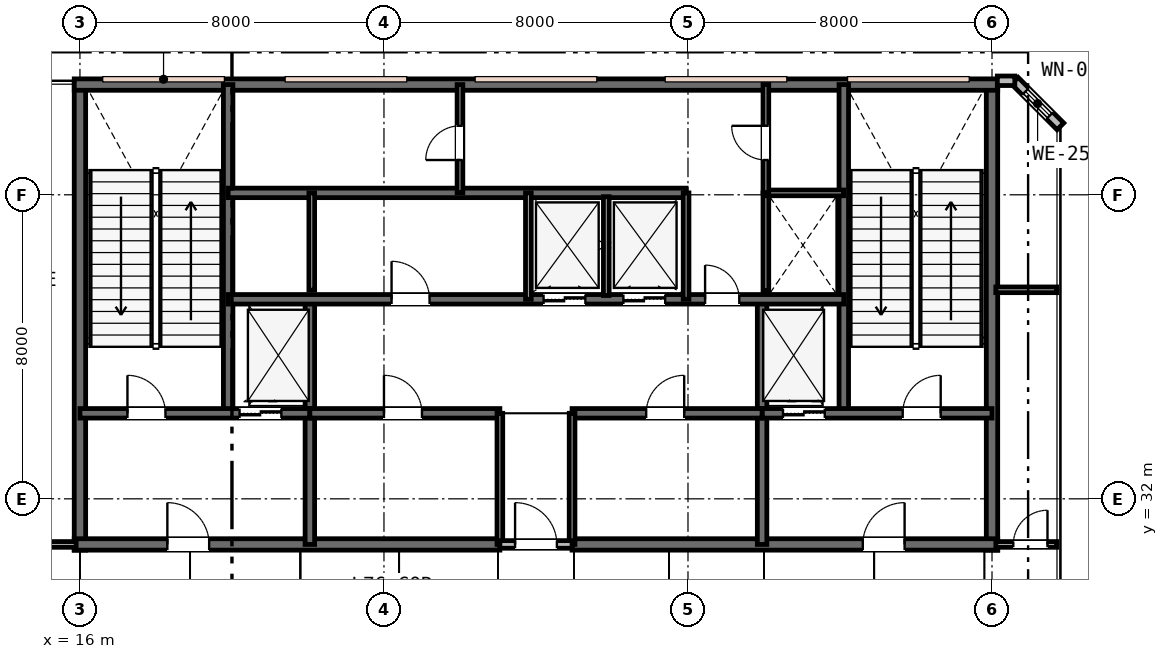
"""IFC4 building model, lengths in metres.
Left out: names, types, materials, properties, quantities, classifications, styles, units other than length and angle.
Written with IfcOpenShell. Run it as: python <this file> out.ifc"""

import sys

from ifc_helpers import new_model, si_unit, direction, frame, frame_2d, origin, place, context, subcontext, project, spatial, rectangle, extrude, element, fill, save


model = new_model("IFC4")
c1 = context("Model", 3, precision=1e-05, world=origin(), true_north=direction((0.0, 1.0)))
c2 = subcontext(c1, "Body", "Model", "MODEL_VIEW")
j1 = project(units=[si_unit("LENGTHUNIT", "METRE"), si_unit("PLANEANGLEUNIT", "RADIAN")], contexts=[c1])
p1 = place(None, origin())
s1 = spatial("IfcSite", under=j1, at=p1, CompositionType="ELEMENT")
p2 = place(p1, origin())
s2 = spatial("IfcBuilding", under=s1, at=p2, CompositionType="ELEMENT")
p3 = place(p2, frame((0.0, 0.0, 295.8)))
s3 = spatial("IfcBuildingStorey", under=s2, at=p3, CompositionType="ELEMENT", Elevation=295.8)
for number, where, z_axis, x_axis in (
    (1, (16.0, 30.65, 0.0), (0.0, 0.0, 1.0), (0.0, 1.0, 0.0)),
    (2, (40.0, 30.65, 0.0), (0.0, 0.0, 1.0), (0.0, 1.0, 0.0)),
):
    element("IfcWall", number, at=place(p3, frame(where, z_axis=z_axis, x_axis=x_axis)), inside=s3, PredefinedType="SHEAR", context=c2, shape_type="SweptSolid", body=[
        extrude(rectangle(XDim=12.3, YDim=0.3, at=frame_2d((6.15, 0.0))), origin(), (0.0, 0.0, 1.0), 5.2),
    ])
p4 = place(p3, frame((15.85, 42.9, 0.0), z_axis=(0.0, 0.0, 1.0), x_axis=(1.0, 0.0, 0.0)))
e3 = element("IfcWall", 3, at=p4, inside=s3, PredefinedType="SHEAR", context=c2, shape_type="SweptSolid", body=[
    extrude(rectangle(XDim=24.3, YDim=0.3, at=frame_2d((12.15, 0.0))), origin(), (0.0, 0.0, 1.0), 5.2),
])
p5 = place(p3, frame((15.85, 30.8, 0.0), z_axis=(0.0, 0.0, 1.0), x_axis=(1.0, 0.0, 0.0)))
e4 = element("IfcWall", 4, at=p5, inside=s3, PredefinedType="SHEAR", context=c2, shape_type="SweptSolid", body=[
    extrude(rectangle(XDim=11.2, YDim=0.3, at=frame_2d((5.6, 0.0))), origin(), (0.0, 0.0, 1.0), 5.2),
])
p6 = place(p5, frame((2.45, 0.0, 0.0)))
e5 = element("IfcOpeningElement", 5, at=p6, cuts=e4, PredefinedType="OPENING", context=c2, shape_type="SweptSolid", body=[
    extrude(rectangle(XDim=1.1, YDim=2.15, at=frame_2d((0.55, 1.075))), frame((0.0, 0.16, 0.0), z_axis=(0.0, -1.0, 0.0), x_axis=(1.0, 0.0, 0.0)), (0.0, 0.0, 1.0), 0.32),
])
p7 = place(p3, frame((28.95, 30.8, 0.0), z_axis=(0.0, 0.0, 1.0), x_axis=(1.0, 0.0, 0.0)))
e6 = element("IfcWall", 6, at=p7, inside=s3, PredefinedType="SHEAR", context=c2, shape_type="SweptSolid", body=[
    extrude(rectangle(XDim=11.2, YDim=0.3, at=frame_2d((5.6, 0.0))), origin(), (0.0, 0.0, 1.0), 5.2),
])
p8 = place(p7, frame((7.65, 0.0, 0.0)))
e7 = element("IfcOpeningElement", 7, at=p8, cuts=e6, PredefinedType="OPENING", context=c2, shape_type="SweptSolid", body=[
    extrude(rectangle(XDim=1.1, YDim=2.15, at=frame_2d((0.55, 1.075))), frame((0.0, 0.16, 0.0), z_axis=(0.0, -1.0, 0.0), x_axis=(1.0, 0.0, 0.0)), (0.0, 0.0, 1.0), 0.32),
])
for number, where, z_axis, x_axis in (
    (8, (19.9, 34.25, 0.0), (0.0, 0.0, 1.0), (0.0, 1.0, 0.0)),
    (9, (36.1, 34.25, 0.0), (0.0, 0.0, 1.0), (0.0, 1.0, 0.0)),
):
    element("IfcWall", number, at=place(p3, frame(where, z_axis=z_axis, x_axis=x_axis)), inside=s3, PredefinedType="SHEAR", context=c2, shape_type="SweptSolid", body=[
        extrude(rectangle(XDim=8.65, YDim=0.25, at=frame_2d((4.325, 0.0))), origin(), (0.0, 0.0, 1.0), 5.2),
    ])
for number, where, z_axis, x_axis in (
    (10, (22.05, 30.8, 0.0), (0.0, 0.0, 1.0), (0.0, 1.0, 0.0)),
    (11, (33.95, 30.8, 0.0), (0.0, 0.0, 1.0), (0.0, 1.0, 0.0)),
):
    element("IfcWall", number, at=place(p3, frame(where, z_axis=z_axis, x_axis=x_axis)), inside=s3, PredefinedType="SHEAR", context=c2, shape_type="SweptSolid", body=[
        extrude(rectangle(XDim=6.45, YDim=0.25, at=frame_2d((3.225, 0.0))), origin(), (0.0, 0.0, 1.0), 5.2),
    ])
p9 = place(p3, frame((16.0, 34.25, 0.0), z_axis=(0.0, 0.0, 1.0), x_axis=(1.0, 0.0, 0.0)))
e12 = element("IfcWall", 12, at=p9, inside=s3, PredefinedType="SHEAR", context=c2, shape_type="SweptSolid", body=[
    extrude(rectangle(XDim=6.05, YDim=0.25, at=frame_2d((3.025, 0.0))), origin(), (0.0, 0.0, 1.0), 5.2),
])
p10 = place(p9, frame((1.25, 0.0, 0.0)))
e13 = element("IfcOpeningElement", 13, at=p10, cuts=e12, PredefinedType="OPENING", context=c2, shape_type="SweptSolid", body=[
    extrude(rectangle(XDim=1.0, YDim=2.15, at=frame_2d((0.5, 1.075))), frame((0.0, 0.135, 0.0), z_axis=(0.0, -1.0, 0.0), x_axis=(1.0, 0.0, 0.0)), (0.0, 0.0, 1.0), 0.27),
])
p11 = place(p9, frame((4.2, 0.0, 0.0)))
e14 = element("IfcOpeningElement", 14, at=p11, cuts=e12, PredefinedType="OPENING", context=c2, shape_type="SweptSolid", body=[
    extrude(rectangle(XDim=1.1, YDim=2.15, at=frame_2d((0.55, 1.075))), frame((0.0, 0.135, 0.0), z_axis=(0.0, -1.0, 0.0), x_axis=(1.0, 0.0, 0.0)), (0.0, 0.0, 1.0), 0.27),
])
p12 = place(p3, frame((33.95, 34.25, 0.0), z_axis=(0.0, 0.0, 1.0), x_axis=(1.0, 0.0, 0.0)))
e15 = element("IfcWall", 15, at=p12, inside=s3, PredefinedType="SHEAR", context=c2, shape_type="SweptSolid", body=[
    extrude(rectangle(XDim=6.05, YDim=0.25, at=frame_2d((3.025, 0.0))), origin(), (0.0, 0.0, 1.0), 5.2),
])
p13 = place(p12, frame((3.7, 0.0, 0.0)))
e16 = element("IfcOpeningElement", 16, at=p13, cuts=e15, PredefinedType="OPENING", context=c2, shape_type="SweptSolid", body=[
    extrude(rectangle(XDim=1.0, YDim=2.15, at=frame_2d((0.5, 1.075))), frame((0.0, 0.135, 0.0), z_axis=(0.0, -1.0, 0.0), x_axis=(1.0, 0.0, 0.0)), (0.0, 0.0, 1.0), 0.27),
])
p14 = place(p12, frame((0.55, 0.0, 0.0)))
e17 = element("IfcOpeningElement", 17, at=p14, cuts=e15, PredefinedType="OPENING", context=c2, shape_type="SweptSolid", body=[
    extrude(rectangle(XDim=1.1, YDim=2.15, at=frame_2d((0.55, 1.075))), frame((0.0, 0.135, 0.0), z_axis=(0.0, -1.0, 0.0), x_axis=(1.0, 0.0, 0.0)), (0.0, 0.0, 1.0), 0.27),
])
p15 = place(p3, frame((22.05, 34.25, 0.0), z_axis=(0.0, 0.0, 1.0), x_axis=(1.0, 0.0, 0.0)))
e18 = element("IfcWall", 18, at=p15, inside=s3, PredefinedType="SHEAR", context=c2, shape_type="SweptSolid", body=[
    extrude(rectangle(XDim=5.0, YDim=0.25, at=frame_2d((2.5, 0.0))), origin(), (0.0, 0.0, 1.0), 5.2),
])
p16 = place(p15, frame((1.95, 0.0, 0.0)))
e19 = element("IfcOpeningElement", 19, at=p16, cuts=e18, PredefinedType="OPENING", context=c2, shape_type="SweptSolid", body=[
    extrude(rectangle(XDim=1.0, YDim=2.15, at=frame_2d((0.5, 1.075))), frame((0.0, 0.135, 0.0), z_axis=(0.0, -1.0, 0.0), x_axis=(1.0, 0.0, 0.0)), (0.0, 0.0, 1.0), 0.27),
])
p17 = place(p3, frame((28.95, 34.25, 0.0), z_axis=(0.0, 0.0, 1.0), x_axis=(1.0, 0.0, 0.0)))
e20 = element("IfcWall", 20, at=p17, inside=s3, PredefinedType="SHEAR", context=c2, shape_type="SweptSolid", body=[
    extrude(rectangle(XDim=5.0, YDim=0.25, at=frame_2d((2.5, 0.0))), origin(), (0.0, 0.0, 1.0), 5.2),
])
p18 = place(p17, frame((1.95, 0.0, 0.0)))
e21 = element("IfcOpeningElement", 21, at=p18, cuts=e20, PredefinedType="OPENING", context=c2, shape_type="SweptSolid", body=[
    extrude(rectangle(XDim=1.0, YDim=2.15, at=frame_2d((0.5, 1.075))), frame((0.0, 0.135, 0.0), z_axis=(0.0, -1.0, 0.0), x_axis=(1.0, 0.0, 0.0)), (0.0, 0.0, 1.0), 0.27),
])
p19 = place(p3, frame((19.9, 37.25, 0.0), z_axis=(0.0, 0.0, 1.0), x_axis=(1.0, 0.0, 0.0)))
e22 = element("IfcWall", 22, at=p19, inside=s3, PredefinedType="SHEAR", context=c2, shape_type="SweptSolid", body=[
    extrude(rectangle(XDim=16.2, YDim=0.25, at=frame_2d((8.1, 0.0))), origin(), (0.0, 0.0, 1.0), 5.2),
])
p20 = place(p19, frame((4.3, 0.0, 0.0)))
e23 = element("IfcOpeningElement", 23, at=p20, cuts=e22, PredefinedType="OPENING", context=c2, shape_type="SweptSolid", body=[
    extrude(rectangle(XDim=1.0, YDim=2.15, at=frame_2d((0.5, 1.075))), frame((0.0, 0.135, 0.0), z_axis=(0.0, -1.0, 0.0), x_axis=(1.0, 0.0, 0.0)), (0.0, 0.0, 1.0), 0.27),
])
p21 = place(p19, frame((12.55, 0.0, 0.0)))
e24 = element("IfcOpeningElement", 24, at=p21, cuts=e22, PredefinedType="OPENING", context=c2, shape_type="SweptSolid", body=[
    extrude(rectangle(XDim=0.9, YDim=2.15, at=frame_2d((0.45, 1.075))), frame((0.0, 0.135, 0.0), z_axis=(0.0, -1.0, 0.0), x_axis=(1.0, 0.0, 0.0)), (0.0, 0.0, 1.0), 0.27),
])
p22 = place(p19, frame((8.3, 0.0, 0.0)))
e25 = element("IfcOpeningElement", 25, at=p22, cuts=e22, PredefinedType="OPENING", context=c2, shape_type="SweptSolid", body=[
    extrude(rectangle(XDim=1.1, YDim=2.15, at=frame_2d((0.55, 1.075))), frame((0.0, 0.135, 0.0), z_axis=(0.0, -1.0, 0.0), x_axis=(1.0, 0.0, 0.0)), (0.0, 0.0, 1.0), 0.27),
])
p23 = place(p19, frame((10.4, 0.0, 0.0)))
e26 = element("IfcOpeningElement", 26, at=p23, cuts=e22, PredefinedType="OPENING", context=c2, shape_type="SweptSolid", body=[
    extrude(rectangle(XDim=1.1, YDim=2.15, at=frame_2d((0.55, 1.075))), frame((0.0, 0.135, 0.0), z_axis=(0.0, -1.0, 0.0), x_axis=(1.0, 0.0, 0.0)), (0.0, 0.0, 1.0), 0.27),
])
p24 = place(p3, frame((19.9, 40.05, 0.0), z_axis=(0.0, 0.0, 1.0), x_axis=(1.0, 0.0, 0.0)))
e27 = element("IfcWall", 27, at=p24, inside=s3, PredefinedType="SHEAR", context=c2, shape_type="SweptSolid", body=[
    extrude(rectangle(XDim=12.05, YDim=0.25, at=frame_2d((6.025, 0.0))), origin(), (0.0, 0.0, 1.0), 5.2),
])
p25 = place(p3, frame((41.8, 41.8, 0.0), z_axis=(0.0, 0.0, 1.0), x_axis=(-0.707106781187, 0.707106781187, 0.0)))
e28 = element("IfcWall", 28, at=p25, inside=s3, PredefinedType="STANDARD", context=c2, shape_type="SweptSolid", body=[
    extrude(rectangle(XDim=1.697, YDim=0.25, at=frame_2d((0.849, 0.0))), origin(), (0.0, 0.0, 1.0), 4.91),
])
p26 = place(p25, frame((0.399, 0.0, 0.9)))
e29 = element("IfcOpeningElement", 29, at=p26, cuts=e28, PredefinedType="OPENING", context=c2, shape_type="SweptSolid", body=[
    extrude(rectangle(XDim=0.9, YDim=1.55, at=frame_2d((0.45, 0.775))), frame((0.0, 0.135, 0.0), z_axis=(0.0, -1.0, 0.0), x_axis=(1.0, 0.0, 0.0)), (0.0, 0.0, 1.0), 0.27),
])
p27 = place(p3, frame((40.6, 43.0, 0.0), z_axis=(0.0, 0.0, 1.0), x_axis=(-1.0, 0.0, 0.0)))
e30 = element("IfcWall", 30, at=p27, inside=s3, PredefinedType="STANDARD", context=c2, shape_type="SweptSolid", body=[
    extrude(rectangle(XDim=0.46, YDim=0.25, at=frame_2d((0.23, 0.0))), origin(), (0.0, 0.0, 1.0), 4.91),
])
for number, where, z_axis, x_axis in (
    (31, (27.05, 30.8, 0.0), (0.0, 0.0, 1.0), (0.0, 1.0, 0.0)),
    (32, (28.95, 30.8, 0.0), (0.0, 0.0, 1.0), (0.0, 1.0, 0.0)),
):
    element("IfcWall", number, at=place(p3, frame(where, z_axis=z_axis, x_axis=x_axis)), inside=s3, PredefinedType="PLUMBINGWALL", context=c2, shape_type="SweptSolid", body=[
        extrude(rectangle(XDim=3.45, YDim=0.15, at=frame_2d((1.725, 0.0))), origin(), (0.0, 0.0, 1.0), 4.91),
    ])
p28 = place(p3, frame((27.05, 30.8, 0.0), z_axis=(0.0, 0.0, 1.0), x_axis=(1.0, 0.0, 0.0)))
e33 = element("IfcWall", 33, at=p28, inside=s3, PredefinedType="PARTITIONING", context=c2, shape_type="SweptSolid", body=[
    extrude(rectangle(XDim=1.9, YDim=0.2, at=frame_2d((0.95, 0.0))), origin(), (0.0, 0.0, 1.0), 4.91),
])
p29 = place(p28, frame((0.4, 0.0, 0.0)))
e34 = element("IfcOpeningElement", 34, at=p29, cuts=e33, PredefinedType="OPENING", context=c2, shape_type="SweptSolid", body=[
    extrude(rectangle(XDim=1.1, YDim=2.15, at=frame_2d((0.55, 1.075))), frame((0.0, 0.11, 0.0), z_axis=(0.0, -1.0, 0.0), x_axis=(1.0, 0.0, 0.0)), (0.0, 0.0, 1.0), 0.22),
])
p30 = place(p3, frame((22.1, 37.49, 0.0), z_axis=(0.0, 0.0, 1.0), x_axis=(0.0, 1.0, 0.0)))
e35 = element("IfcWall", 35, at=p30, inside=s3, PredefinedType="PLUMBINGWALL", context=c2, shape_type="SweptSolid", body=[
    extrude(rectangle(XDim=2.56, YDim=0.15, at=frame_2d((1.28, 0.0))), origin(), (0.0, 0.0, 1.0), 4.91),
])
for number, where, z_axis, x_axis in (
    (36, (27.8, 37.25, 0.0), (0.0, 0.0, 1.0), (0.0, 1.0, 0.0)),
    (37, (31.95, 37.25, 0.0), (0.0, 0.0, 1.0), (0.0, 1.0, 0.0)),
):
    element("IfcWall", number, at=place(p3, frame(where, z_axis=z_axis, x_axis=x_axis)), inside=s3, PredefinedType="PLUMBINGWALL", context=c2, shape_type="SweptSolid", body=[
        extrude(rectangle(XDim=2.8, YDim=0.15, at=frame_2d((1.4, 0.0))), origin(), (0.0, 0.0, 1.0), 4.91),
    ])
p31 = place(p3, frame((29.85, 37.35, 0.0), z_axis=(0.0, 0.0, 1.0), x_axis=(0.0, 1.0, 0.0)))
e38 = element("IfcWall", 38, at=p31, inside=s3, PredefinedType="PLUMBINGWALL", context=c2, shape_type="SweptSolid", body=[
    extrude(rectangle(XDim=2.6, YDim=0.15, at=frame_2d((1.3, 0.0))), origin(), (0.0, 0.0, 1.0), 4.91),
])
p32 = place(p3, frame((34.05, 37.473, 0.0), z_axis=(0.0, 0.0, 1.0), x_axis=(0.0, 1.0, 0.0)))
e39 = element("IfcWall", 39, at=p32, inside=s3, PredefinedType="PLUMBINGWALL", context=c2, shape_type="SweptSolid", body=[
    extrude(rectangle(XDim=2.577, YDim=0.15, at=frame_2d((1.288, 0.0))), origin(), (0.0, 0.0, 1.0), 4.91),
])
p33 = place(p3, frame((34.05, 40.05, 0.0), z_axis=(0.0, 0.0, 1.0), x_axis=(1.0, 0.0, 0.0)))
e40 = element("IfcWall", 40, at=p33, inside=s3, PredefinedType="PARTITIONING", context=c2, shape_type="SweptSolid", body=[
    extrude(rectangle(XDim=2.05, YDim=0.15, at=frame_2d((1.025, 0.0))), origin(), (0.0, 0.0, 1.0), 4.91),
])
p34 = place(p3, frame((34.05, 40.05, 0.0), z_axis=(0.0, 0.0, 1.0), x_axis=(0.0, 1.0, 0.0)))
e41 = element("IfcWall", 41, at=p34, inside=s3, PredefinedType="PARTITIONING", context=c2, shape_type="SweptSolid", body=[
    extrude(rectangle(XDim=2.85, YDim=0.15, at=frame_2d((1.425, 0.0))), origin(), (0.0, 0.0, 1.0), 4.91),
])
p35 = place(p34, frame((0.865, 0.0, 0.0)))
e42 = element("IfcOpeningElement", 42, at=p35, cuts=e41, PredefinedType="OPENING", context=c2, shape_type="SweptSolid", body=[
    extrude(rectangle(XDim=0.9, YDim=2.15, at=frame_2d((0.45, 1.075))), frame((0.0, 0.085, 0.0), z_axis=(0.0, -1.0, 0.0), x_axis=(1.0, 0.0, 0.0)), (0.0, 0.0, 1.0), 0.17),
])
p36 = place(p3, frame((26.0, 40.05, 0.0), z_axis=(0.0, 0.0, 1.0), x_axis=(0.0, 1.0, 0.0)))
e43 = element("IfcWall", 43, at=p36, inside=s3, PredefinedType="PARTITIONING", context=c2, shape_type="SweptSolid", body=[
    extrude(rectangle(XDim=2.85, YDim=0.15, at=frame_2d((1.425, 0.0))), origin(), (0.0, 0.0, 1.0), 4.91),
])
p37 = place(p36, frame((0.865, 0.0, 0.0)))
e44 = element("IfcOpeningElement", 44, at=p37, cuts=e43, PredefinedType="OPENING", context=c2, shape_type="SweptSolid", body=[
    extrude(rectangle(XDim=0.9, YDim=2.15, at=frame_2d((0.45, 1.075))), frame((0.0, 0.085, 0.0), z_axis=(0.0, -1.0, 0.0), x_axis=(1.0, 0.0, 0.0)), (0.0, 0.0, 1.0), 0.17),
])
p38 = place(p3, frame((40.1, 30.8, 0.0), z_axis=(0.0, 0.0, 1.0), x_axis=(1.0, 0.0, 0.0)))
e45 = element("IfcWall", 45, at=p38, inside=s3, PredefinedType="PARTITIONING", context=c2, shape_type="SweptSolid", body=[
    extrude(rectangle(XDim=1.6, YDim=0.15, at=frame_2d((0.8, 0.0))), origin(), (0.0, 0.0, 1.0), 4.91),
])
p39 = place(p38, frame((0.46, 0.0, 0.0)))
e46 = element("IfcOpeningElement", 46, at=p39, cuts=e45, PredefinedType="OPENING", context=c2, shape_type="SweptSolid", body=[
    extrude(rectangle(XDim=0.9, YDim=2.15, at=frame_2d((0.45, 1.075))), frame((0.0, 0.085, 0.0), z_axis=(0.0, -1.0, 0.0), x_axis=(1.0, 0.0, 0.0)), (0.0, 0.0, 1.0), 0.17),
])
p40 = place(p3, frame((40.1, 37.5, 0.0), z_axis=(0.0, 0.0, 1.0), x_axis=(1.0, 0.0, 0.0)))
e47 = element("IfcWall", 47, at=p40, inside=s3, PredefinedType="PARTITIONING", context=c2, shape_type="SweptSolid", body=[
    extrude(rectangle(XDim=1.6, YDim=0.15, at=frame_2d((0.8, 0.0))), origin(), (0.0, 0.0, 1.0), 4.91),
])
p41 = place(p3, frame((9.3, 30.8, 0.0), z_axis=(0.0, 0.0, 1.0), x_axis=(1.0, 0.0, 0.0)))
e48 = element("IfcWall", 48, at=p41, inside=s3, PredefinedType="PARTITIONING", context=c2, shape_type="SweptSolid", body=[
    extrude(rectangle(XDim=6.6, YDim=0.15, at=frame_2d((3.3, 0.0))), origin(), (0.0, 0.0, 1.0), 4.91),
])
p42 = place(p41, frame((2.875, 0.0, 0.0)))
e49 = element("IfcOpeningElement", 49, at=p42, cuts=e48, PredefinedType="OPENING", context=c2, shape_type="SweptSolid", body=[
    extrude(rectangle(XDim=0.95, YDim=2.15, at=frame_2d((0.475, 1.075))), frame((0.0, 0.085, 0.0), z_axis=(0.0, -1.0, 0.0), x_axis=(1.0, 0.0, 0.0)), (0.0, 0.0, 1.0), 0.17),
])
p43 = place(p26, origin())
e50 = element("IfcWindow", 50, at=p43, inside=s3, PartitioningType="SINGLE_PANEL", PredefinedType="WINDOW", context=c2, shape_type="SweptSolid", body=[
    extrude(rectangle(XDim=0.9, YDim=1.55, at=frame_2d((0.45, 0.775))), frame((0.0, 0.03, 0.0), z_axis=(0.0, -1.0, 0.0), x_axis=(1.0, 0.0, 0.0)), (0.0, 0.0, 1.0), 0.06),
])
fill(e29, e50)
p44 = place(p29, origin())
e51 = element("IfcDoor", 51, at=p44, inside=s3, OperationType="SINGLE_SWING_LEFT", PredefinedType="DOOR", context=c2, shape_type="SweptSolid", body=[
    extrude(rectangle(XDim=1.1, YDim=2.15, at=frame_2d((0.55, 1.075))), frame((0.0, 0.025, 0.0), z_axis=(0.0, -1.0, 0.0), x_axis=(1.0, 0.0, 0.0)), (0.0, 0.0, 1.0), 0.05),
])
fill(e34, e51)
p45 = place(p10, origin())
e52 = element("IfcDoor", 52, at=p45, inside=s3, OperationType="SINGLE_SWING_LEFT", PredefinedType="DOOR", context=c2, shape_type="SweptSolid", body=[
    extrude(rectangle(XDim=1.0, YDim=2.15, at=frame_2d((0.5, 1.075))), frame((0.0, 0.025, 0.0), z_axis=(0.0, -1.0, 0.0), x_axis=(1.0, 0.0, 0.0)), (0.0, 0.0, 1.0), 0.05),
])
fill(e13, e52)
p46 = place(p13, origin())
e53 = element("IfcDoor", 53, at=p46, inside=s3, OperationType="SINGLE_SWING_RIGHT", PredefinedType="DOOR", context=c2, shape_type="SweptSolid", body=[
    extrude(rectangle(XDim=1.0, YDim=2.15, at=frame_2d((0.5, 1.075))), frame((0.0, 0.025, 0.0), z_axis=(0.0, -1.0, 0.0), x_axis=(1.0, 0.0, 0.0)), (0.0, 0.0, 1.0), 0.05),
])
fill(e16, e53)
p47 = place(p6, origin())
e54 = element("IfcDoor", 54, at=p47, inside=s3, OperationType="SINGLE_SWING_LEFT", PredefinedType="DOOR", context=c2, shape_type="SweptSolid", body=[
    extrude(rectangle(XDim=1.1, YDim=2.15, at=frame_2d((0.55, 1.075))), frame((0.0, 0.025, 0.0), z_axis=(0.0, -1.0, 0.0), x_axis=(1.0, 0.0, 0.0)), (0.0, 0.0, 1.0), 0.05),
])
fill(e5, e54)
p48 = place(p8, origin())
e55 = element("IfcDoor", 55, at=p48, inside=s3, OperationType="SINGLE_SWING_RIGHT", PredefinedType="DOOR", context=c2, shape_type="SweptSolid", body=[
    extrude(rectangle(XDim=1.1, YDim=2.15, at=frame_2d((0.55, 1.075))), frame((0.0, 0.025, 0.0), z_axis=(0.0, -1.0, 0.0), x_axis=(1.0, 0.0, 0.0)), (0.0, 0.0, 1.0), 0.05),
])
fill(e7, e55)
p49 = place(p16, origin())
e56 = element("IfcDoor", 56, at=p49, inside=s3, OperationType="SINGLE_SWING_LEFT", PredefinedType="DOOR", context=c2, shape_type="SweptSolid", body=[
    extrude(rectangle(XDim=1.0, YDim=2.15, at=frame_2d((0.5, 1.075))), frame((0.0, 0.025, 0.0), z_axis=(0.0, -1.0, 0.0), x_axis=(1.0, 0.0, 0.0)), (0.0, 0.0, 1.0), 0.05),
])
fill(e19, e56)
p50 = place(p18, origin())
e57 = element("IfcDoor", 57, at=p50, inside=s3, OperationType="SINGLE_SWING_RIGHT", PredefinedType="DOOR", context=c2, shape_type="SweptSolid", body=[
    extrude(rectangle(XDim=1.0, YDim=2.15, at=frame_2d((0.5, 1.075))), frame((0.0, 0.025, 0.0), z_axis=(0.0, -1.0, 0.0), x_axis=(1.0, 0.0, 0.0)), (0.0, 0.0, 1.0), 0.05),
])
fill(e21, e57)
p51 = place(p20, origin())
e58 = element("IfcDoor", 58, at=p51, inside=s3, OperationType="SINGLE_SWING_LEFT", PredefinedType="DOOR", context=c2, shape_type="SweptSolid", body=[
    extrude(rectangle(XDim=1.0, YDim=2.15, at=frame_2d((0.5, 1.075))), frame((0.0, 0.025, 0.0), z_axis=(0.0, -1.0, 0.0), x_axis=(1.0, 0.0, 0.0)), (0.0, 0.0, 1.0), 0.05),
])
fill(e23, e58)
p52 = place(p21, origin())
e59 = element("IfcDoor", 59, at=p52, inside=s3, OperationType="SINGLE_SWING_LEFT", PredefinedType="DOOR", context=c2, shape_type="SweptSolid", body=[
    extrude(rectangle(XDim=0.9, YDim=2.15, at=frame_2d((0.45, 1.075))), frame((0.0, 0.025, 0.0), z_axis=(0.0, -1.0, 0.0), x_axis=(1.0, 0.0, 0.0)), (0.0, 0.0, 1.0), 0.05),
])
fill(e24, e59)
p53 = place(p35, origin())
e60 = element("IfcDoor", 60, at=p53, inside=s3, OperationType="SINGLE_SWING_RIGHT", PredefinedType="DOOR", context=c2, shape_type="SweptSolid", body=[
    extrude(rectangle(XDim=0.9, YDim=2.15, at=frame_2d((0.45, 1.075))), frame((0.0, 0.025, 0.0), z_axis=(0.0, -1.0, 0.0), x_axis=(1.0, 0.0, 0.0)), (0.0, 0.0, 1.0), 0.05),
])
fill(e42, e60)
p54 = place(p37, origin())
e61 = element("IfcDoor", 61, at=p54, inside=s3, OperationType="SINGLE_SWING_LEFT", PredefinedType="DOOR", context=c2, shape_type="SweptSolid", body=[
    extrude(rectangle(XDim=0.9, YDim=2.15, at=frame_2d((0.45, 1.075))), frame((0.0, 0.025, 0.0), z_axis=(0.0, -1.0, 0.0), x_axis=(1.0, 0.0, 0.0)), (0.0, 0.0, 1.0), 0.05),
])
fill(e44, e61)
p55 = place(p39, origin())
e62 = element("IfcDoor", 62, at=p55, inside=s3, OperationType="SINGLE_SWING_RIGHT", PredefinedType="DOOR", context=c2, shape_type="SweptSolid", body=[
    extrude(rectangle(XDim=0.9, YDim=2.15, at=frame_2d((0.45, 1.075))), frame((0.0, 0.025, 0.0), z_axis=(0.0, -1.0, 0.0), x_axis=(1.0, 0.0, 0.0)), (0.0, 0.0, 1.0), 0.05),
])
fill(e46, e62)
p56 = place(p11, origin())
e63 = element("IfcDoor", 63, at=p56, inside=s3, OperationType="DOUBLE_DOOR_SLIDING", PredefinedType="DOOR", context=c2, shape_type="SweptSolid", body=[
    extrude(rectangle(XDim=1.1, YDim=2.15, at=frame_2d((0.55, 1.075))), frame((0.0, 0.025, 0.0), z_axis=(0.0, -1.0, 0.0), x_axis=(1.0, 0.0, 0.0)), (0.0, 0.0, 1.0), 0.05),
])
fill(e14, e63)
p57 = place(p14, origin())
e64 = element("IfcDoor", 64, at=p57, inside=s3, OperationType="DOUBLE_DOOR_SLIDING", PredefinedType="DOOR", context=c2, shape_type="SweptSolid", body=[
    extrude(rectangle(XDim=1.1, YDim=2.15, at=frame_2d((0.55, 1.075))), frame((0.0, 0.025, 0.0), z_axis=(0.0, -1.0, 0.0), x_axis=(1.0, 0.0, 0.0)), (0.0, 0.0, 1.0), 0.05),
])
fill(e17, e64)
p58 = place(p22, origin())
e65 = element("IfcDoor", 65, at=p58, inside=s3, OperationType="DOUBLE_DOOR_SLIDING", PredefinedType="DOOR", context=c2, shape_type="SweptSolid", body=[
    extrude(rectangle(XDim=1.1, YDim=2.15, at=frame_2d((0.55, 1.075))), frame((0.0, 0.025, 0.0), z_axis=(0.0, -1.0, 0.0), x_axis=(1.0, 0.0, 0.0)), (0.0, 0.0, 1.0), 0.05),
])
fill(e25, e65)
p59 = place(p23, origin())
e66 = element("IfcDoor", 66, at=p59, inside=s3, OperationType="DOUBLE_DOOR_SLIDING", PredefinedType="DOOR", context=c2, shape_type="SweptSolid", body=[
    extrude(rectangle(XDim=1.1, YDim=2.15, at=frame_2d((0.55, 1.075))), frame((0.0, 0.025, 0.0), z_axis=(0.0, -1.0, 0.0), x_axis=(1.0, 0.0, 0.0)), (0.0, 0.0, 1.0), 0.05),
])
fill(e26, e66)
save(model, sys.argv[1])
